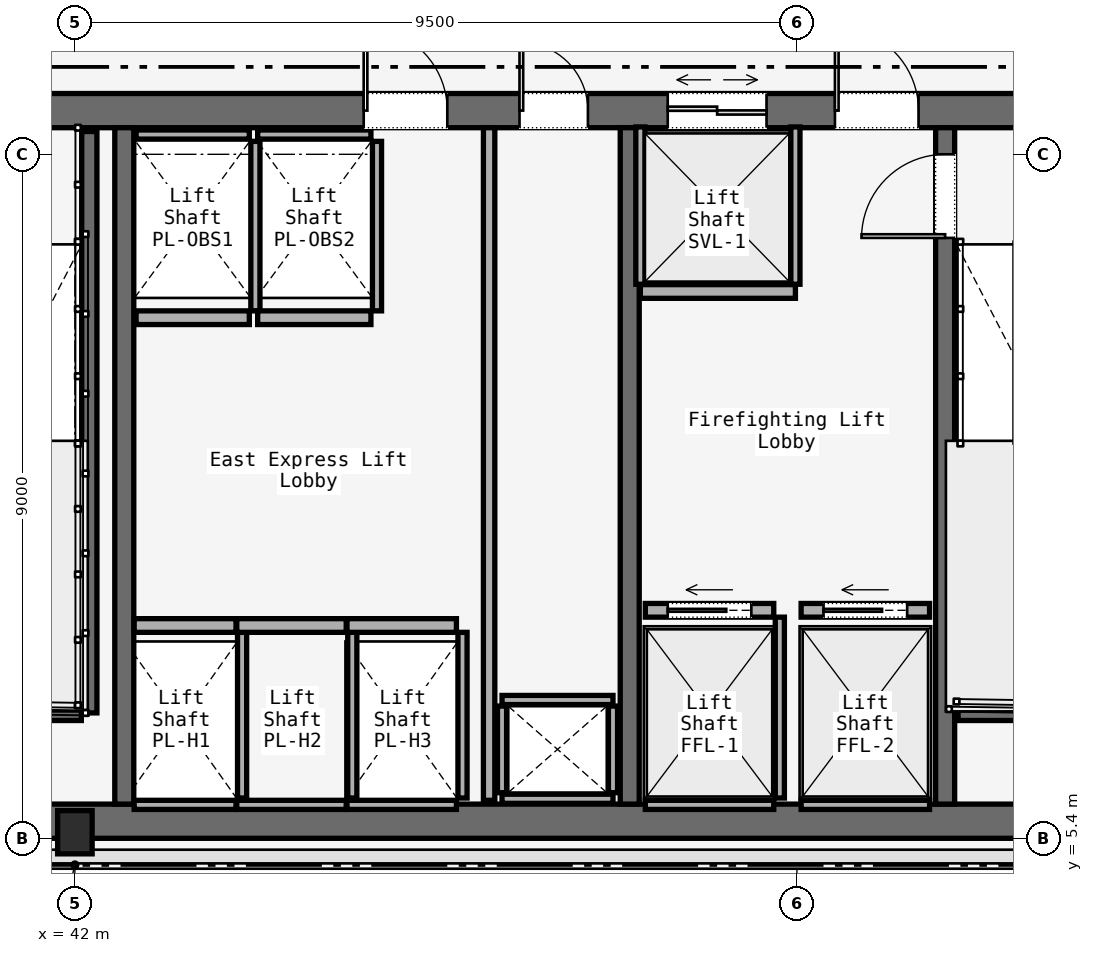
"""IFC4 building model, lengths in metres.
Left out: names, types, materials, properties, quantities, classifications, styles, units other than length and angle.
Written with IfcOpenShell. Run it as: python <this file> out.ifc"""

import sys

from ifc_helpers import new_model, si_unit, direction, frame, frame_2d, origin, origin_2d, place, context, subcontext, project, spatial, rectangle, i_section, extrude, element, fill, save


model = new_model("IFC4")
c1 = context("Model", 3, precision=1e-05, world=origin(), true_north=direction((0.0, 1.0)))
c2 = subcontext(c1, "Body", "Model", "MODEL_VIEW")
j1 = project(units=[si_unit("LENGTHUNIT", "METRE"), si_unit("PLANEANGLEUNIT", "RADIAN")], contexts=[c1])
p1 = place(None, origin())
s1 = spatial("IfcSite", under=j1, at=p1, CompositionType="ELEMENT")
p2 = place(p1, origin())
s2 = spatial("IfcBuilding", under=s1, at=p2, CompositionType="ELEMENT")
p3 = place(p2, frame((0.0, 0.0, 47.4)))
s3 = spatial("IfcBuildingStorey", under=s2, at=p3, CompositionType="ELEMENT", Elevation=47.4)
p4 = place(p3, frame((26.45, 14.975, 0.0), z_axis=(0.0, 0.0, 1.0), x_axis=(1.0, 0.0, 0.0)))
e1 = element("IfcWall", 1, at=p4, inside=s3, PredefinedType="SOLIDWALL", context=c2, shape_type="SweptSolid", body=[
    extrude(rectangle(XDim=31.1, YDim=0.45, at=frame_2d((15.55, 0.0))), origin(), (0.0, 0.0, 1.0), 3.58),
])
p5 = place(p4, frame((1.65, 0.0, 0.0)))
e2 = element("IfcOpeningElement", 2, at=p5, cuts=e1, PredefinedType="OPENING", context=c2, shape_type="SweptSolid", body=[
    extrude(rectangle(XDim=1.1, YDim=2.2, at=frame_2d((0.55, 1.1))), frame((0.0, 0.225, 0.0), z_axis=(0.0, -1.0, 0.0), x_axis=(1.0, 0.0, 0.0)), (0.0, 0.0, 1.0), 0.45),
])
p6 = place(p4, frame((13.65, 0.0, 0.0)))
e3 = element("IfcOpeningElement", 3, at=p6, cuts=e1, PredefinedType="OPENING", context=c2, shape_type="SweptSolid", body=[
    extrude(rectangle(XDim=1.1, YDim=2.2, at=frame_2d((0.55, 1.1))), frame((0.0, 0.225, 0.0), z_axis=(0.0, -1.0, 0.0), x_axis=(1.0, 0.0, 0.0)), (0.0, 0.0, 1.0), 0.45),
])
p7 = place(p4, frame((25.55, 0.0, 0.0)))
e4 = element("IfcOpeningElement", 4, at=p7, cuts=e1, PredefinedType="OPENING", context=c2, shape_type="SweptSolid", body=[
    extrude(rectangle(XDim=1.1, YDim=2.2, at=frame_2d((0.55, 1.1))), frame((0.0, 0.225, 0.0), z_axis=(0.0, -1.0, 0.0), x_axis=(1.0, 0.0, 0.0)), (0.0, 0.0, 1.0), 0.45),
])
p8 = place(p4, frame((10.7, 0.0, 0.0)))
e5 = element("IfcOpeningElement", 5, at=p8, cuts=e1, PredefinedType="OPENING", context=c2, shape_type="SweptSolid", body=[
    extrude(rectangle(XDim=1.4, YDim=2.2, at=frame_2d((0.7, 1.1))), frame((0.0, 0.225, 0.0), z_axis=(0.0, -1.0, 0.0), x_axis=(1.0, 0.0, 0.0)), (0.0, 0.0, 1.0), 0.45),
])
p9 = place(p4, frame((19.35, 0.0, 0.0)))
e6 = element("IfcOpeningElement", 6, at=p9, cuts=e1, PredefinedType="OPENING", context=c2, shape_type="SweptSolid", body=[
    extrude(rectangle(XDim=1.1, YDim=2.2, at=frame_2d((0.55, 1.1))), frame((0.0, 0.225, 0.0), z_axis=(0.0, -1.0, 0.0), x_axis=(1.0, 0.0, 0.0)), (0.0, 0.0, 1.0), 0.45),
])
p10 = place(p4, frame((21.4, 0.0, 0.0)))
e7 = element("IfcOpeningElement", 7, at=p10, cuts=e1, PredefinedType="OPENING", context=c2, shape_type="SweptSolid", body=[
    extrude(rectangle(XDim=0.9, YDim=2.1, at=frame_2d((0.45, 1.05))), frame((0.0, 0.225, 0.0), z_axis=(0.0, -1.0, 0.0), x_axis=(1.0, 0.0, 0.0)), (0.0, 0.0, 1.0), 0.45),
])
p11 = place(p4, frame((23.35, 0.0, 0.0)))
e8 = element("IfcOpeningElement", 8, at=p11, cuts=e1, PredefinedType="OPENING", context=c2, shape_type="SweptSolid", body=[
    extrude(rectangle(XDim=1.3, YDim=2.3, at=frame_2d((0.65, 1.15))), frame((0.0, 0.225, 0.0), z_axis=(0.0, -1.0, 0.0), x_axis=(1.0, 0.0, 0.0)), (0.0, 0.0, 1.0), 0.45),
])
p12 = place(p3, frame((26.45, 5.625, 0.0), z_axis=(0.0, 0.0, 1.0), x_axis=(1.0, 0.0, 0.0)))
e9 = element("IfcWall", 9, at=p12, inside=s3, PredefinedType="SOLIDWALL", context=c2, shape_type="SweptSolid", body=[
    extrude(rectangle(XDim=31.1, YDim=0.45, at=frame_2d((15.55, 0.0))), origin(), (0.0, 0.0, 1.0), 3.58),
])
for number, where, z_axis, x_axis in (
    (10, (42.65, 5.85, 0.0), (0.0, 0.0, 1.0), (0.0, 1.0, 0.0)),
    (11, (49.3, 5.85, 0.0), (0.0, 0.0, 1.0), (0.0, 1.0, 0.0)),
):
    element("IfcWall", number, at=place(p3, frame(where, z_axis=z_axis, x_axis=x_axis)), inside=s3, PredefinedType="SOLIDWALL", context=c2, shape_type="SweptSolid", body=[
        extrude(rectangle(XDim=8.9, YDim=0.25, at=frame_2d((4.45, 0.0))), origin(), (0.0, 0.0, 1.0), 3.58),
    ])
p13 = place(p3, frame((53.45, 5.85, 0.0), z_axis=(0.0, 0.0, 1.0), x_axis=(0.0, 1.0, 0.0)))
e12 = element("IfcWall", 12, at=p13, inside=s3, PredefinedType="SOLIDWALL", context=c2, shape_type="SweptSolid", body=[
    extrude(rectangle(XDim=8.9, YDim=0.25, at=frame_2d((4.45, 0.0))), origin(), (0.0, 0.0, 1.0), 3.58),
])
p14 = place(p13, frame((7.45, 0.0, 0.0)))
e13 = element("IfcOpeningElement", 13, at=p14, cuts=e12, PredefinedType="OPENING", context=c2, shape_type="SweptSolid", body=[
    extrude(rectangle(XDim=1.1, YDim=2.2, at=frame_2d((0.55, 1.1))), frame((0.0, 0.125, 0.0), z_axis=(0.0, -1.0, 0.0), x_axis=(1.0, 0.0, 0.0)), (0.0, 0.0, 1.0), 0.25),
])
p15 = place(p3, frame((42.0, 5.48, 0.0), z_axis=(0.0, 0.0, 1.0), x_axis=(1.0, 0.0, 0.0)))
e14 = element("IfcColumn", 14, at=p15, inside=s3, PredefinedType="COLUMN", context=c2, shape_type="SweptSolid", body=[
    extrude(i_section(OverallWidth=0.454, OverallDepth=0.569, WebThickness=0.078, FlangeThickness=0.08, FilletRadius=0.015, at=origin_2d()), origin(), (0.0, 0.0, 1.0), 3.58),
])
p16 = place(p3, frame((42.19, 14.7, 0.0), z_axis=(0.0, 0.0, 1.0), x_axis=(0.0, -1.0, 0.0)))
e15 = element("IfcWall", 15, at=p16, inside=s3, PredefinedType="SOLIDWALL", context=c2, shape_type="SweptSolid", body=[
    extrude(rectangle(XDim=7.65, YDim=0.2, at=frame_2d((3.825, 0.0))), origin(), (0.0, 0.0, 1.0), 3.8),
])
for number, where, z_axis, x_axis in (
    (16, (38.97, 7.05, 0.0), (0.0, 0.0, 1.0), (1.0, 0.0, 0.0)),
    (17, (53.62, 7.05, 0.0), (0.0, 0.0, 1.0), (1.0, 0.0, 0.0)),
):
    element("IfcWall", number, at=place(p3, frame(where, z_axis=z_axis, x_axis=x_axis)), inside=s3, PredefinedType="SOLIDWALL", context=c2, shape_type="SweptSolid", body=[
        extrude(rectangle(XDim=3.115, YDim=0.2, at=frame_2d((1.558, 0.0))), origin(), (0.0, 0.0, 1.0), 3.8),
    ])
for number, where, z_axis, x_axis in (
    (18, (47.62, 5.92, 0.0), (0.0, 0.0, 1.0), (1.0, 0.0, 0.0)),
    (19, (47.62, 7.22, 0.0), (0.0, 0.0, 1.0), (1.0, 0.0, 0.0)),
):
    element("IfcWall", number, at=place(p3, frame(where, z_axis=z_axis, x_axis=x_axis)), inside=s3, PredefinedType="SOLIDWALL", context=c2, shape_type="SweptSolid", body=[
        extrude(rectangle(XDim=1.46, YDim=0.12, at=frame_2d((0.73, 0.0))), origin(), (0.0, 0.0, 1.0), 2.933),
    ])
for number, where, z_axis, x_axis in (
    (20, (47.62, 6.0, 0.0), (0.0, 0.0, 1.0), (0.0, 1.0, 0.0)),
    (21, (49.08, 6.0, 0.0), (0.0, 0.0, 1.0), (0.0, 1.0, 0.0)),
):
    element("IfcWall", number, at=place(p3, frame(where, z_axis=z_axis, x_axis=x_axis)), inside=s3, PredefinedType="SOLIDWALL", context=c2, shape_type="SweptSolid", body=[
        extrude(rectangle(XDim=1.14, YDim=0.12, at=frame_2d((0.57, 0.0))), origin(), (0.0, 0.0, 1.0), 2.933),
    ])
p17 = place(p3, frame((47.45, 5.9, 0.0), z_axis=(0.0, 0.0, 1.0), x_axis=(0.0, 1.0, 0.0)))
e22 = element("IfcWall", 22, at=p17, inside=s3, PredefinedType="PARTITIONING", context=c2, shape_type="SweptSolid", body=[
    extrude(rectangle(XDim=8.85, YDim=0.15, at=frame_2d((4.425, 0.0))), origin(), (0.0, 0.0, 1.0), 2.933),
])
p18 = place(p3, frame((42.78, 8.2, 0.0), z_axis=(0.0, 0.0, 1.0), x_axis=(1.0, 0.0, 0.0)))
e23 = element("IfcWall", 23, at=p18, inside=s3, PredefinedType="SOLIDWALL", context=c2, shape_type="SweptSolid", body=[
    extrude(rectangle(XDim=1.34, YDim=0.18, at=frame_2d((0.67, 0.0))), origin(), (0.0, 0.0, 1.0), 2.933),
])
p19 = place(p3, frame((42.78, 5.84, 0.0), z_axis=(0.0, 0.0, 1.0), x_axis=(1.0, 0.0, 0.0)))
e24 = element("IfcWall", 24, at=p19, inside=s3, PredefinedType="SOLIDWALL", context=c2, shape_type="SweptSolid", body=[
    extrude(rectangle(XDim=1.34, YDim=0.12, at=frame_2d((0.67, 0.0))), origin(), (0.0, 0.0, 1.0), 2.933),
])
p20 = place(p3, frame((44.2, 5.93, 0.0), z_axis=(0.0, 0.0, 1.0), x_axis=(0.0, 1.0, 0.0)))
e25 = element("IfcWall", 25, at=p20, inside=s3, PredefinedType="SOLIDWALL", context=c2, shape_type="SweptSolid", body=[
    extrude(rectangle(XDim=2.18, YDim=0.12, at=frame_2d((1.09, 0.0))), origin(), (0.0, 0.0, 1.0), 2.933),
])
p21 = place(p3, frame((44.13, 8.2, 0.0), z_axis=(0.0, 0.0, 1.0), x_axis=(1.0, 0.0, 0.0)))
e26 = element("IfcWall", 26, at=p21, inside=s3, PredefinedType="SOLIDWALL", context=c2, shape_type="SweptSolid", body=[
    extrude(rectangle(XDim=1.44, YDim=0.18, at=frame_2d((0.72, 0.0))), origin(), (0.0, 0.0, 1.0), 2.933),
])
p22 = place(p3, frame((44.13, 5.84, 0.0), z_axis=(0.0, 0.0, 1.0), x_axis=(1.0, 0.0, 0.0)))
e27 = element("IfcWall", 27, at=p22, inside=s3, PredefinedType="SOLIDWALL", context=c2, shape_type="SweptSolid", body=[
    extrude(rectangle(XDim=1.44, YDim=0.12, at=frame_2d((0.72, 0.0))), origin(), (0.0, 0.0, 1.0), 2.933),
])
p23 = place(p3, frame((45.65, 5.93, 0.0), z_axis=(0.0, 0.0, 1.0), x_axis=(0.0, 1.0, 0.0)))
e28 = element("IfcWall", 28, at=p23, inside=s3, PredefinedType="SOLIDWALL", context=c2, shape_type="SweptSolid", body=[
    extrude(rectangle(XDim=2.18, YDim=0.12, at=frame_2d((1.09, 0.0))), origin(), (0.0, 0.0, 1.0), 2.933),
])
p24 = place(p3, frame((45.58, 8.2, 0.0), z_axis=(0.0, 0.0, 1.0), x_axis=(1.0, 0.0, 0.0)))
e29 = element("IfcWall", 29, at=p24, inside=s3, PredefinedType="SOLIDWALL", context=c2, shape_type="SweptSolid", body=[
    extrude(rectangle(XDim=1.44, YDim=0.18, at=frame_2d((0.72, 0.0))), origin(), (0.0, 0.0, 1.0), 2.933),
])
p25 = place(p3, frame((45.58, 5.84, 0.0), z_axis=(0.0, 0.0, 1.0), x_axis=(1.0, 0.0, 0.0)))
e30 = element("IfcWall", 30, at=p25, inside=s3, PredefinedType="SOLIDWALL", context=c2, shape_type="SweptSolid", body=[
    extrude(rectangle(XDim=1.44, YDim=0.12, at=frame_2d((0.72, 0.0))), origin(), (0.0, 0.0, 1.0), 2.933),
])
p26 = place(p3, frame((47.1, 5.93, 0.0), z_axis=(0.0, 0.0, 1.0), x_axis=(0.0, 1.0, 0.0)))
e31 = element("IfcWall", 31, at=p26, inside=s3, PredefinedType="SOLIDWALL", context=c2, shape_type="SweptSolid", body=[
    extrude(rectangle(XDim=2.18, YDim=0.12, at=frame_2d((1.09, 0.0))), origin(), (0.0, 0.0, 1.0), 2.933),
])
p27 = place(p3, frame((42.805, 12.25, 0.0), z_axis=(0.0, 0.0, 1.0), x_axis=(1.0, 0.0, 0.0)))
e32 = element("IfcWall", 32, at=p27, inside=s3, PredefinedType="SOLIDWALL", context=c2, shape_type="SweptSolid", body=[
    extrude(rectangle(XDim=1.49, YDim=0.18, at=frame_2d((0.745, 0.0))), origin(), (0.0, 0.0, 1.0), 2.933),
])
p28 = place(p3, frame((42.805, 14.66, 0.0), z_axis=(0.0, 0.0, 1.0), x_axis=(1.0, 0.0, 0.0)))
e33 = element("IfcWall", 33, at=p28, inside=s3, PredefinedType="SOLIDWALL", context=c2, shape_type="SweptSolid", body=[
    extrude(rectangle(XDim=1.49, YDim=0.12, at=frame_2d((0.745, 0.0))), origin(), (0.0, 0.0, 1.0), 2.933),
])
p29 = place(p3, frame((44.375, 12.34, 0.0), z_axis=(0.0, 0.0, 1.0), x_axis=(0.0, 1.0, 0.0)))
e34 = element("IfcWall", 34, at=p29, inside=s3, PredefinedType="SOLIDWALL", context=c2, shape_type="SweptSolid", body=[
    extrude(rectangle(XDim=2.23, YDim=0.12, at=frame_2d((1.115, 0.0))), origin(), (0.0, 0.0, 1.0), 2.933),
])
p30 = place(p3, frame((44.405, 12.25, 0.0), z_axis=(0.0, 0.0, 1.0), x_axis=(1.0, 0.0, 0.0)))
e35 = element("IfcWall", 35, at=p30, inside=s3, PredefinedType="SOLIDWALL", context=c2, shape_type="SweptSolid", body=[
    extrude(rectangle(XDim=1.49, YDim=0.18, at=frame_2d((0.745, 0.0))), origin(), (0.0, 0.0, 1.0), 2.933),
])
p31 = place(p3, frame((44.405, 14.66, 0.0), z_axis=(0.0, 0.0, 1.0), x_axis=(1.0, 0.0, 0.0)))
e36 = element("IfcWall", 36, at=p31, inside=s3, PredefinedType="SOLIDWALL", context=c2, shape_type="SweptSolid", body=[
    extrude(rectangle(XDim=1.49, YDim=0.12, at=frame_2d((0.745, 0.0))), origin(), (0.0, 0.0, 1.0), 2.933),
])
p32 = place(p3, frame((45.975, 12.34, 0.0), z_axis=(0.0, 0.0, 1.0), x_axis=(0.0, 1.0, 0.0)))
e37 = element("IfcWall", 37, at=p32, inside=s3, PredefinedType="SOLIDWALL", context=c2, shape_type="SweptSolid", body=[
    extrude(rectangle(XDim=2.23, YDim=0.12, at=frame_2d((1.115, 0.0))), origin(), (0.0, 0.0, 1.0), 2.933),
])
p33 = place(p3, frame((49.505, 8.4, 0.0), z_axis=(0.0, 0.0, 1.0), x_axis=(1.0, 0.0, 0.0)))
e38 = element("IfcWall", 38, at=p33, inside=s3, PredefinedType="SOLIDWALL", context=c2, shape_type="SweptSolid", body=[
    extrude(rectangle(XDim=1.69, YDim=0.18, at=frame_2d((0.845, 0.0))), origin(), (0.0, 0.0, 1.0), 2.933),
])
p34 = place(p33, frame((0.295, 0.0, 0.0)))
e39 = element("IfcOpeningElement", 39, at=p34, cuts=e38, PredefinedType="OPENING", context=c2, shape_type="SweptSolid", body=[
    extrude(rectangle(XDim=1.1, YDim=2.2, at=frame_2d((0.55, 1.1))), frame((0.0, 0.09, 0.0), z_axis=(0.0, -1.0, 0.0), x_axis=(1.0, 0.0, 0.0)), (0.0, 0.0, 1.0), 0.18),
])
p35 = place(p3, frame((49.505, 5.84, 0.0), z_axis=(0.0, 0.0, 1.0), x_axis=(1.0, 0.0, 0.0)))
e40 = element("IfcWall", 40, at=p35, inside=s3, PredefinedType="SOLIDWALL", context=c2, shape_type="SweptSolid", body=[
    extrude(rectangle(XDim=1.69, YDim=0.12, at=frame_2d((0.845, 0.0))), origin(), (0.0, 0.0, 1.0), 2.933),
])
p36 = place(p3, frame((51.275, 5.93, 0.0), z_axis=(0.0, 0.0, 1.0), x_axis=(0.0, 1.0, 0.0)))
e41 = element("IfcWall", 41, at=p36, inside=s3, PredefinedType="SOLIDWALL", context=c2, shape_type="SweptSolid", body=[
    extrude(rectangle(XDim=2.38, YDim=0.12, at=frame_2d((1.19, 0.0))), origin(), (0.0, 0.0, 1.0), 2.933),
])
p37 = place(p3, frame((51.555, 8.4, 0.0), z_axis=(0.0, 0.0, 1.0), x_axis=(1.0, 0.0, 0.0)))
e42 = element("IfcWall", 42, at=p37, inside=s3, PredefinedType="SOLIDWALL", context=c2, shape_type="SweptSolid", body=[
    extrude(rectangle(XDim=1.69, YDim=0.18, at=frame_2d((0.845, 0.0))), origin(), (0.0, 0.0, 1.0), 2.933),
])
p38 = place(p37, frame((0.295, 0.0, 0.0)))
e43 = element("IfcOpeningElement", 43, at=p38, cuts=e42, PredefinedType="OPENING", context=c2, shape_type="SweptSolid", body=[
    extrude(rectangle(XDim=1.1, YDim=2.2, at=frame_2d((0.55, 1.1))), frame((0.0, 0.09, 0.0), z_axis=(0.0, -1.0, 0.0), x_axis=(1.0, 0.0, 0.0)), (0.0, 0.0, 1.0), 0.18),
])
p39 = place(p3, frame((51.555, 5.84, 0.0), z_axis=(0.0, 0.0, 1.0), x_axis=(1.0, 0.0, 0.0)))
e44 = element("IfcWall", 44, at=p39, inside=s3, PredefinedType="SOLIDWALL", context=c2, shape_type="SweptSolid", body=[
    extrude(rectangle(XDim=1.69, YDim=0.12, at=frame_2d((0.845, 0.0))), origin(), (0.0, 0.0, 1.0), 2.933),
])
p40 = place(p3, frame((49.44, 12.595, 0.0), z_axis=(0.0, 0.0, 1.0), x_axis=(1.0, 0.0, 0.0)))
e45 = element("IfcWall", 45, at=p40, inside=s3, PredefinedType="SOLIDWALL", context=c2, shape_type="SweptSolid", body=[
    extrude(rectangle(XDim=2.04, YDim=0.18, at=frame_2d((1.02, 0.0))), origin(), (0.0, 0.0, 1.0), 2.933),
])
for number, where, z_axis, x_axis in (
    (46, (49.44, 12.69, 0.0), (0.0, 0.0, 1.0), (0.0, 1.0, 0.0)),
    (47, (51.48, 12.69, 0.0), (0.0, 0.0, 1.0), (0.0, 1.0, 0.0)),
):
    element("IfcWall", number, at=place(p3, frame(where, z_axis=z_axis, x_axis=x_axis)), inside=s3, PredefinedType="SOLIDWALL", context=c2, shape_type="SweptSolid", body=[
        extrude(rectangle(XDim=2.07, YDim=0.12, at=frame_2d((1.035, 0.0))), origin(), (0.0, 0.0, 1.0), 2.933),
    ])
p41 = place(p7, origin())
e48 = element("IfcDoor", 48, at=p41, inside=s3, OperationType="SINGLE_SWING_RIGHT", PredefinedType="DOOR", context=c2, shape_type="SweptSolid", body=[
    extrude(rectangle(XDim=1.1, YDim=2.2, at=frame_2d((0.55, 1.1))), frame((0.0, 0.025, 0.0), z_axis=(0.0, -1.0, 0.0), x_axis=(1.0, 0.0, 0.0)), (0.0, 0.0, 1.0), 0.05),
])
fill(e4, e48)
p42 = place(p9, origin())
e49 = element("IfcDoor", 49, at=p42, inside=s3, OperationType="SINGLE_SWING_LEFT", PredefinedType="DOOR", context=c2, shape_type="SweptSolid", body=[
    extrude(rectangle(XDim=1.1, YDim=2.2, at=frame_2d((0.55, 1.1))), frame((0.0, 0.025, 0.0), z_axis=(0.0, -1.0, 0.0), x_axis=(1.0, 0.0, 0.0)), (0.0, 0.0, 1.0), 0.05),
])
fill(e6, e49)
p43 = place(p10, origin())
e50 = element("IfcDoor", 50, at=p43, inside=s3, OperationType="SINGLE_SWING_LEFT", PredefinedType="DOOR", context=c2, shape_type="SweptSolid", body=[
    extrude(rectangle(XDim=0.9, YDim=2.1, at=frame_2d((0.45, 1.05))), frame((0.0, 0.025, 0.0), z_axis=(0.0, -1.0, 0.0), x_axis=(1.0, 0.0, 0.0)), (0.0, 0.0, 1.0), 0.05),
])
fill(e7, e50)
p44 = place(p14, origin())
e51 = element("IfcDoor", 51, at=p44, inside=s3, OperationType="SINGLE_SWING_LEFT", PredefinedType="DOOR", context=c2, shape_type="SweptSolid", body=[
    extrude(rectangle(XDim=1.1, YDim=2.2, at=frame_2d((0.55, 1.1))), frame((0.0, 0.025, 0.0), z_axis=(0.0, -1.0, 0.0), x_axis=(1.0, 0.0, 0.0)), (0.0, 0.0, 1.0), 0.05),
])
fill(e13, e51)
p45 = place(p34, origin())
e52 = element("IfcDoor", 52, at=p45, inside=s3, OperationType="SLIDING_TO_LEFT", PredefinedType="DOOR", context=c2, shape_type="SweptSolid", body=[
    extrude(rectangle(XDim=1.1, YDim=2.2, at=frame_2d((0.55, 1.1))), frame((0.0, 0.025, 0.0), z_axis=(0.0, -1.0, 0.0), x_axis=(1.0, 0.0, 0.0)), (0.0, 0.0, 1.0), 0.05),
])
fill(e39, e52)
p46 = place(p38, origin())
e53 = element("IfcDoor", 53, at=p46, inside=s3, OperationType="SLIDING_TO_LEFT", PredefinedType="DOOR", context=c2, shape_type="SweptSolid", body=[
    extrude(rectangle(XDim=1.1, YDim=2.2, at=frame_2d((0.55, 1.1))), frame((0.0, 0.025, 0.0), z_axis=(0.0, -1.0, 0.0), x_axis=(1.0, 0.0, 0.0)), (0.0, 0.0, 1.0), 0.05),
])
fill(e43, e53)
p47 = place(p11, origin())
e54 = element("IfcDoor", 54, at=p47, inside=s3, OperationType="DOUBLE_DOOR_SLIDING", PredefinedType="DOOR", context=c2, shape_type="SweptSolid", body=[
    extrude(rectangle(XDim=1.3, YDim=2.3, at=frame_2d((0.65, 1.15))), frame((0.0, 0.025, 0.0), z_axis=(0.0, -1.0, 0.0), x_axis=(1.0, 0.0, 0.0)), (0.0, 0.0, 1.0), 0.05),
])
fill(e8, e54)
save(model, sys.argv[1])
